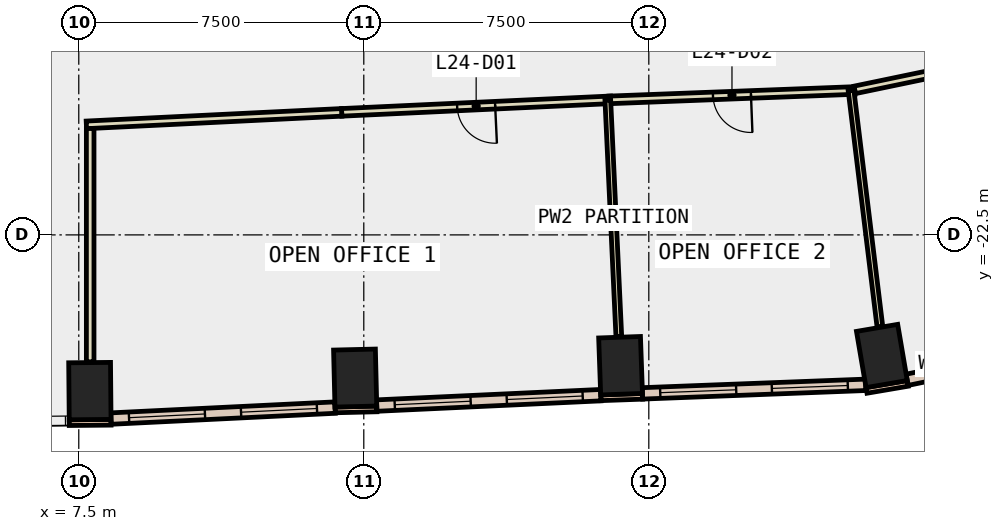
"""IFC4 building model, lengths in metres.
Left out: names, types, materials, properties, quantities, classifications, styles, units other than length and angle.
Written with IfcOpenShell. Run it as: python <this file> out.ifc"""

import sys

from ifc_helpers import new_model, si_unit, direction, frame, frame_2d, origin, origin_2d, place, context, subcontext, project, spatial, rectangle, extrude, element, fill, save


model = new_model("IFC4")
c1 = context("Model", 3, precision=1e-05, world=origin(), true_north=direction((0.0, 1.0)))
c2 = subcontext(c1, "Body", "Model", "MODEL_VIEW")
j1 = project(units=[si_unit("LENGTHUNIT", "METRE"), si_unit("PLANEANGLEUNIT", "RADIAN")], contexts=[c1])
p1 = place(None, origin())
s1 = spatial("IfcSite", under=j1, at=p1, CompositionType="ELEMENT")
p2 = place(p1, origin())
s2 = spatial("IfcBuilding", under=s1, at=p2, CompositionType="ELEMENT")
p3 = place(p2, frame((0.0, 0.0, 111.8)))
s3 = spatial("IfcBuildingStorey", under=s2, at=p3, CompositionType="ELEMENT", Elevation=111.8)
for number, where, z_axis, x_axis in (
    (1, (7.792, -26.61, -0.4), (0.0, 0.0, 1.0), (1.0, 0.009, 0.0)),
    (2, (14.773, -26.267, -0.4), (0.0, 0.0, 1.0), (1.0, 0.024, 0.0)),
    (3, (21.757, -25.942, -0.4), (0.0, 0.0, 1.0), (0.999, 0.035, 0.0)),
    (4, (28.633, -25.686, -0.4), (0.0, 0.0, 1.0), (0.986, 0.168, 0.0)),
):
    element("IfcColumn", number, at=place(p3, frame(where, z_axis=z_axis, x_axis=x_axis)), inside=s3, PredefinedType="COLUMN", context=c2, shape_type="SweptSolid", body=[
        extrude(rectangle(XDim=1.1, YDim=1.5, at=origin_2d()), origin(), (0.0, 0.0, 1.0), 4.2),
    ])
p4 = place(p3, frame((7.249, -27.44, 0.0), z_axis=(0.0, 0.0, 1.0), x_axis=(0.99995860686, 0.009098602504, 0.0)))
e5 = element("IfcWall", 5, at=p4, inside=s3, PredefinedType="STANDARD", context=c2, shape_type="SweptSolid", body=[
    extrude(rectangle(XDim=1.1, YDim=0.15, at=frame_2d((0.55, 0.0))), origin(), (0.0, 0.0, 1.0), 3.8),
])
p5 = place(p3, frame((14.243, -27.105, 0.0), z_axis=(0.0, 0.0, 1.0), x_axis=(0.999723421029, 0.023517683673, 0.0)))
e6 = element("IfcWall", 6, at=p5, inside=s3, PredefinedType="STANDARD", context=c2, shape_type="SweptSolid", body=[
    extrude(rectangle(XDim=1.1, YDim=0.15, at=frame_2d((0.55, 0.0))), origin(), (0.0, 0.0, 1.0), 3.8),
])
p6 = place(p3, frame((21.237, -26.786, 0.0), z_axis=(0.0, 0.0, 1.0), x_axis=(0.999376638472, 0.035303462679, 0.0)))
e7 = element("IfcWall", 7, at=p6, inside=s3, PredefinedType="STANDARD", context=c2, shape_type="SweptSolid", body=[
    extrude(rectangle(XDim=1.1, YDim=0.15, at=frame_2d((0.55, 0.0))), origin(), (0.0, 0.0, 1.0), 3.8),
])
p7 = place(p3, frame((28.229, -26.592, 0.0), z_axis=(0.0, 0.0, 1.0), x_axis=(0.985763338892, 0.168138751323, 0.0)))
e8 = element("IfcWall", 8, at=p7, inside=s3, PredefinedType="STANDARD", context=c2, shape_type="SweptSolid", body=[
    extrude(rectangle(XDim=1.101, YDim=0.15, at=frame_2d((0.55, 0.0))), origin(), (0.0, 0.0, 1.0), 3.8),
])
p8 = place(p3, frame((8.347, -27.333, 0.0), z_axis=(0.0, 0.0, 1.0), x_axis=(0.998800343021, 0.048968099633, 0.0)))
e9 = element("IfcWall", 9, at=p8, inside=s3, PredefinedType="STANDARD", context=c2, shape_type="SweptSolid", body=[
    extrude(rectangle(XDim=5.903, YDim=0.3, at=frame_2d((2.952, 0.0))), origin(), (0.0, 0.0, 1.0), 3.8),
])
p9 = place(p8, frame((0.476, 0.0, 0.9)))
e10 = element("IfcOpeningElement", 10, at=p9, cuts=e9, PredefinedType="OPENING", context=c2, shape_type="SweptSolid", body=[
    extrude(rectangle(XDim=2.0, YDim=2.6, at=frame_2d((1.0, 1.3))), frame((0.0, 0.16, 0.0), z_axis=(0.0, -1.0, 0.0), x_axis=(1.0, 0.0, 0.0)), (0.0, 0.0, 1.0), 0.32),
])
p10 = place(p8, frame((3.427, 0.0, 0.9)))
e11 = element("IfcOpeningElement", 11, at=p10, cuts=e9, PredefinedType="OPENING", context=c2, shape_type="SweptSolid", body=[
    extrude(rectangle(XDim=2.0, YDim=2.6, at=frame_2d((1.0, 1.3))), frame((0.0, 0.16, 0.0), z_axis=(0.0, -1.0, 0.0), x_axis=(1.0, 0.0, 0.0)), (0.0, 0.0, 1.0), 0.32),
])
p11 = place(p3, frame((15.34, -26.991, 0.0), z_axis=(0.0, 0.0, 1.0), x_axis=(0.998922139094, 0.046417238469, 0.0)))
e12 = element("IfcWall", 12, at=p11, inside=s3, PredefinedType="STANDARD", context=c2, shape_type="SweptSolid", body=[
    extrude(rectangle(XDim=5.901, YDim=0.3, at=frame_2d((2.951, 0.0))), origin(), (0.0, 0.0, 1.0), 3.8),
])
p12 = place(p11, frame((0.475, 0.0, 0.9)))
e13 = element("IfcOpeningElement", 13, at=p12, cuts=e12, PredefinedType="OPENING", context=c2, shape_type="SweptSolid", body=[
    extrude(rectangle(XDim=2.0, YDim=2.6, at=frame_2d((1.0, 1.3))), frame((0.0, 0.16, 0.0), z_axis=(0.0, -1.0, 0.0), x_axis=(1.0, 0.0, 0.0)), (0.0, 0.0, 1.0), 0.32),
])
p13 = place(p11, frame((3.426, 0.0, 0.9)))
e14 = element("IfcOpeningElement", 14, at=p13, cuts=e12, PredefinedType="OPENING", context=c2, shape_type="SweptSolid", body=[
    extrude(rectangle(XDim=2.0, YDim=2.6, at=frame_2d((1.0, 1.3))), frame((0.0, 0.16, 0.0), z_axis=(0.0, -1.0, 0.0), x_axis=(1.0, 0.0, 0.0)), (0.0, 0.0, 1.0), 0.32),
])
p14 = place(p3, frame((22.332, -26.67, 0.0), z_axis=(0.0, 0.0, 1.0), x_axis=(0.999267908582, 0.038257638169, 0.0)))
e15 = element("IfcWall", 15, at=p14, inside=s3, PredefinedType="STANDARD", context=c2, shape_type="SweptSolid", body=[
    extrude(rectangle(XDim=5.877, YDim=0.3, at=frame_2d((2.939, 0.0))), origin(), (0.0, 0.0, 1.0), 3.8),
])
p15 = place(p14, frame((0.469, 0.0, 0.9)))
e16 = element("IfcOpeningElement", 16, at=p15, cuts=e15, PredefinedType="OPENING", context=c2, shape_type="SweptSolid", body=[
    extrude(rectangle(XDim=2.0, YDim=2.6, at=frame_2d((1.0, 1.3))), frame((0.0, 0.16, 0.0), z_axis=(0.0, -1.0, 0.0), x_axis=(1.0, 0.0, 0.0)), (0.0, 0.0, 1.0), 0.32),
])
p16 = place(p14, frame((3.408, 0.0, 0.9)))
e17 = element("IfcOpeningElement", 17, at=p16, cuts=e15, PredefinedType="OPENING", context=c2, shape_type="SweptSolid", body=[
    extrude(rectangle(XDim=2.0, YDim=2.6, at=frame_2d((1.0, 1.3))), frame((0.0, 0.16, 0.0), z_axis=(0.0, -1.0, 0.0), x_axis=(1.0, 0.0, 0.0)), (0.0, 0.0, 1.0), 0.32),
])
p17 = place(p3, frame((29.297, -26.313, 0.0), z_axis=(0.0, 0.0, 1.0), x_axis=(0.979080614496, 0.203472726227, 0.0)))
e18 = element("IfcWall", 18, at=p17, inside=s3, PredefinedType="STANDARD", context=c2, shape_type="SweptSolid", body=[
    extrude(rectangle(XDim=4.05, YDim=0.3, at=frame_2d((2.025, 0.0))), origin(), (0.0, 0.0, 1.0), 3.8),
])
p18 = place(p17, frame((1.325, 0.0, 0.9)))
e19 = element("IfcOpeningElement", 19, at=p18, cuts=e18, PredefinedType="OPENING", context=c2, shape_type="SweptSolid", body=[
    extrude(rectangle(XDim=1.4, YDim=2.6, at=frame_2d((0.7, 1.3))), frame((0.0, 0.16, 0.0), z_axis=(0.0, -1.0, 0.0), x_axis=(1.0, 0.0, 0.0)), (0.0, 0.0, 1.0), 0.32),
])
p19 = place(p3, frame((21.496, -18.946, 0.0), z_axis=(0.0, 0.0, 1.0), x_axis=(-0.99891602876, -0.046548549767, 0.0)))
e20 = element("IfcWall", 20, at=p19, inside=s3, PredefinedType="PARTITIONING", context=c2, shape_type="SweptSolid", body=[
    extrude(rectangle(XDim=7.086, YDim=0.2, at=frame_2d((3.543, 0.0))), origin(), (0.0, 0.0, 1.0), 3.8),
])
p20 = place(p19, frame((3.043, 0.0, 0.0)))
e21 = element("IfcOpeningElement", 21, at=p20, cuts=e20, PredefinedType="OPENING", context=c2, shape_type="SweptSolid", body=[
    extrude(rectangle(XDim=1.0, YDim=2.1, at=frame_2d((0.5, 1.05))), frame((0.0, 0.11, 0.0), z_axis=(0.0, -1.0, 0.0), x_axis=(1.0, 0.0, 0.0)), (0.0, 0.0, 1.0), 0.22),
])
p21 = place(p3, frame((14.418, -19.276, 0.0), z_axis=(0.0, 0.0, 1.0), x_axis=(-0.998802248261, -0.04892922305, 0.0)))
e22 = element("IfcWall", 22, at=p21, inside=s3, PredefinedType="PARTITIONING", context=c2, shape_type="SweptSolid", body=[
    extrude(rectangle(XDim=6.726, YDim=0.2, at=frame_2d((3.363, 0.0))), origin(), (0.0, 0.0, 1.0), 3.8),
])
p22 = place(p3, frame((27.922, -18.7, 0.0), z_axis=(0.0, 0.0, 1.0), x_axis=(-0.999265458352, -0.038321583274, 0.0)))
e23 = element("IfcWall", 23, at=p22, inside=s3, PredefinedType="PARTITIONING", context=c2, shape_type="SweptSolid", body=[
    extrude(rectangle(XDim=6.473, YDim=0.2, at=frame_2d((3.236, 0.0))), origin(), (0.0, 0.0, 1.0), 3.8),
])
p23 = place(p22, frame((2.736, 0.0, 0.0)))
e24 = element("IfcOpeningElement", 24, at=p23, cuts=e23, PredefinedType="OPENING", context=c2, shape_type="SweptSolid", body=[
    extrude(rectangle(XDim=1.0, YDim=2.1, at=frame_2d((0.5, 1.05))), frame((0.0, 0.11, 0.0), z_axis=(0.0, -1.0, 0.0), x_axis=(1.0, 0.0, 0.0)), (0.0, 0.0, 1.0), 0.22),
])
p24 = place(p3, frame((30.209, -18.208, 0.0), z_axis=(0.0, 0.0, 1.0), x_axis=(-0.979049860969, -0.203620651545, 0.0)))
e25 = element("IfcWall", 25, at=p24, inside=s3, PredefinedType="PARTITIONING", context=c2, shape_type="SweptSolid", body=[
    extrude(rectangle(XDim=2.338, YDim=0.2, at=frame_2d((1.169, 0.0))), origin(), (0.0, 0.0, 1.0), 3.8),
])
p25 = place(p3, frame((7.8, -19.701, 0.0), z_axis=(0.0, 0.0, 1.0), x_axis=(0.0, -1.0, 0.0)))
e26 = element("IfcWall", 26, at=p25, inside=s3, PredefinedType="PARTITIONING", context=c2, shape_type="SweptSolid", body=[
    extrude(rectangle(XDim=6.139, YDim=0.2, at=frame_2d((3.07, 0.0))), origin(), (0.0, 0.0, 1.0), 3.8),
])
p26 = place(p3, frame((21.421, -18.95, 0.0), z_axis=(0.0, 0.0, 1.0), x_axis=(0.046555976109, -0.998915682672, 0.0)))
e27 = element("IfcWall", 27, at=p26, inside=s3, PredefinedType="PARTITIONING", context=c2, shape_type="SweptSolid", body=[
    extrude(rectangle(XDim=6.23, YDim=0.15, at=frame_2d((3.115, 0.0))), origin(), (0.0, 0.0, 1.0), 3.8),
])
p27 = place(p3, frame((27.822, -18.704, 0.0), z_axis=(0.0, 0.0, 1.0), x_axis=(0.121325411006, -0.992612786863, 0.0)))
e28 = element("IfcWall", 28, at=p27, inside=s3, PredefinedType="PARTITIONING", context=c2, shape_type="SweptSolid", body=[
    extrude(rectangle(XDim=6.256, YDim=0.15, at=frame_2d((3.128, 0.0))), origin(), (0.0, 0.0, 1.0), 3.8),
])
p28 = place(p9, origin())
e29 = element("IfcWindow", 29, at=p28, inside=s3, PartitioningType="SINGLE_PANEL", PredefinedType="WINDOW", context=c2, shape_type="SweptSolid", body=[
    extrude(rectangle(XDim=2.0, YDim=2.6, at=frame_2d((1.0, 1.3))), frame((0.0, 0.03, 0.0), z_axis=(0.0, -1.0, 0.0), x_axis=(1.0, 0.0, 0.0)), (0.0, 0.0, 1.0), 0.06),
])
fill(e10, e29)
p29 = place(p10, origin())
e30 = element("IfcWindow", 30, at=p29, inside=s3, PartitioningType="SINGLE_PANEL", PredefinedType="WINDOW", context=c2, shape_type="SweptSolid", body=[
    extrude(rectangle(XDim=2.0, YDim=2.6, at=frame_2d((1.0, 1.3))), frame((0.0, 0.03, 0.0), z_axis=(0.0, -1.0, 0.0), x_axis=(1.0, 0.0, 0.0)), (0.0, 0.0, 1.0), 0.06),
])
fill(e11, e30)
p30 = place(p12, origin())
e31 = element("IfcWindow", 31, at=p30, inside=s3, PartitioningType="SINGLE_PANEL", PredefinedType="WINDOW", context=c2, shape_type="SweptSolid", body=[
    extrude(rectangle(XDim=2.0, YDim=2.6, at=frame_2d((1.0, 1.3))), frame((0.0, 0.03, 0.0), z_axis=(0.0, -1.0, 0.0), x_axis=(1.0, 0.0, 0.0)), (0.0, 0.0, 1.0), 0.06),
])
fill(e13, e31)
p31 = place(p13, origin())
e32 = element("IfcWindow", 32, at=p31, inside=s3, PartitioningType="SINGLE_PANEL", PredefinedType="WINDOW", context=c2, shape_type="SweptSolid", body=[
    extrude(rectangle(XDim=2.0, YDim=2.6, at=frame_2d((1.0, 1.3))), frame((0.0, 0.03, 0.0), z_axis=(0.0, -1.0, 0.0), x_axis=(1.0, 0.0, 0.0)), (0.0, 0.0, 1.0), 0.06),
])
fill(e14, e32)
p32 = place(p15, origin())
e33 = element("IfcWindow", 33, at=p32, inside=s3, PartitioningType="SINGLE_PANEL", PredefinedType="WINDOW", context=c2, shape_type="SweptSolid", body=[
    extrude(rectangle(XDim=2.0, YDim=2.6, at=frame_2d((1.0, 1.3))), frame((0.0, 0.03, 0.0), z_axis=(0.0, -1.0, 0.0), x_axis=(1.0, 0.0, 0.0)), (0.0, 0.0, 1.0), 0.06),
])
fill(e16, e33)
p33 = place(p16, origin())
e34 = element("IfcWindow", 34, at=p33, inside=s3, PartitioningType="SINGLE_PANEL", PredefinedType="WINDOW", context=c2, shape_type="SweptSolid", body=[
    extrude(rectangle(XDim=2.0, YDim=2.6, at=frame_2d((1.0, 1.3))), frame((0.0, 0.03, 0.0), z_axis=(0.0, -1.0, 0.0), x_axis=(1.0, 0.0, 0.0)), (0.0, 0.0, 1.0), 0.06),
])
fill(e17, e34)
p34 = place(p20, origin())
e35 = element("IfcDoor", 35, at=p34, inside=s3, OperationType="SINGLE_SWING_LEFT", PredefinedType="DOOR", context=c2, shape_type="SweptSolid", body=[
    extrude(rectangle(XDim=1.0, YDim=2.1, at=frame_2d((0.5, 1.05))), frame((0.0, 0.025, 0.0), z_axis=(0.0, -1.0, 0.0), x_axis=(1.0, 0.0, 0.0)), (0.0, 0.0, 1.0), 0.05),
])
fill(e21, e35)
p35 = place(p23, origin())
e36 = element("IfcDoor", 36, at=p35, inside=s3, OperationType="SINGLE_SWING_LEFT", PredefinedType="DOOR", context=c2, shape_type="SweptSolid", body=[
    extrude(rectangle(XDim=1.0, YDim=2.1, at=frame_2d((0.5, 1.05))), frame((0.0, 0.025, 0.0), z_axis=(0.0, -1.0, 0.0), x_axis=(1.0, 0.0, 0.0)), (0.0, 0.0, 1.0), 0.05),
])
fill(e24, e36)
save(model, sys.argv[1])
